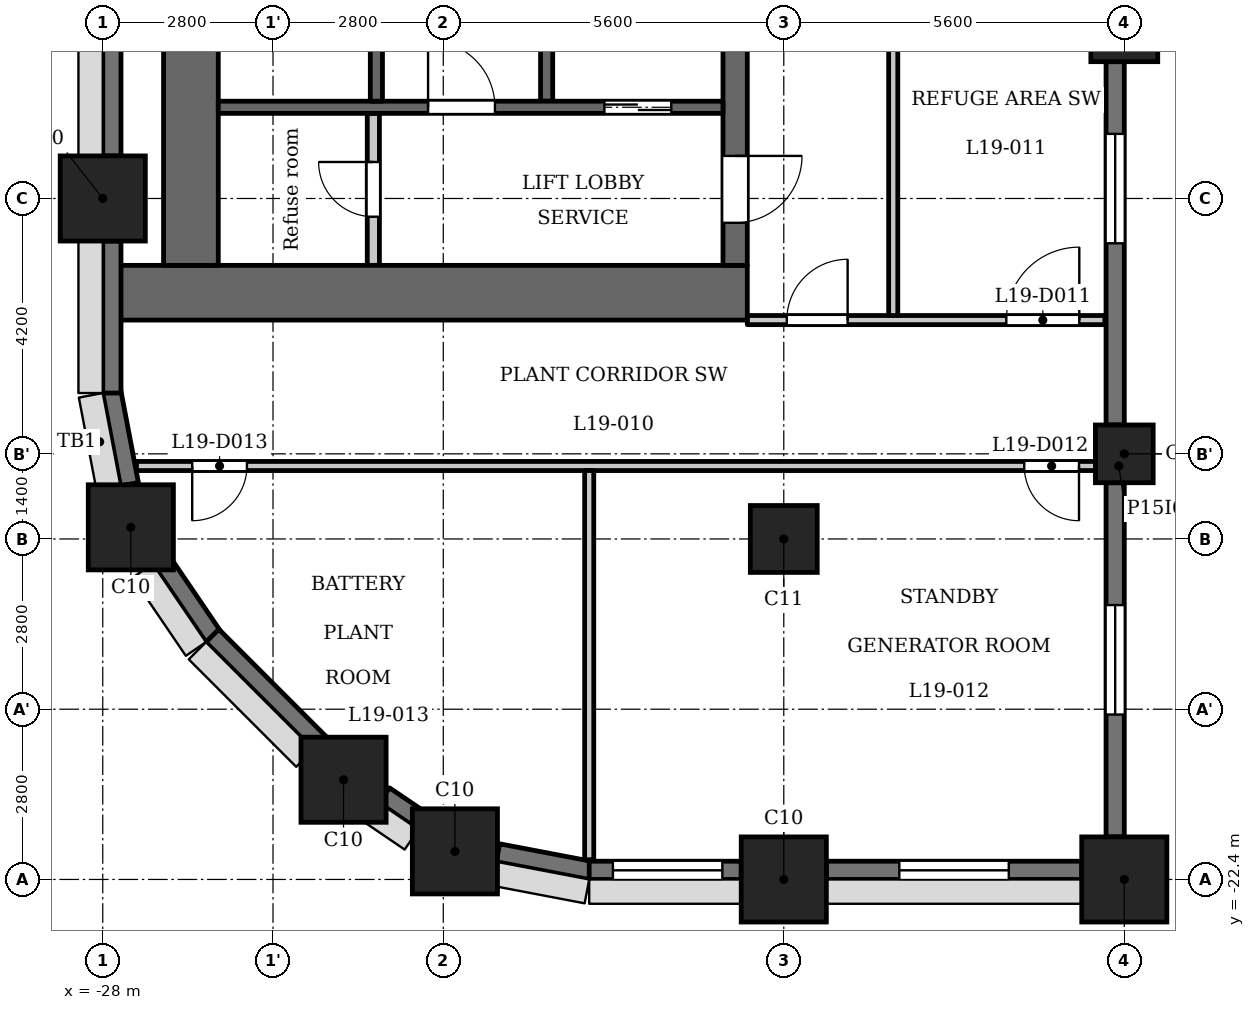
"""IFC4 building model, lengths in metres.
Left out: names, types, materials, properties, quantities, classifications, styles, units other than length and angle.
Written with IfcOpenShell. Run it as: python <this file> out.ifc"""

import sys

from ifc_helpers import new_model, si_unit, direction, frame, frame_2d, origin, origin_2d, place, context, subcontext, project, spatial, rectangle, extrude, element, fill, save


model = new_model("IFC4")
c1 = context("Model", 3, precision=1e-05, world=origin(), true_north=direction((0.0, 1.0)))
c2 = subcontext(c1, "Body", "Model", "MODEL_VIEW")
j1 = project(units=[si_unit("LENGTHUNIT", "METRE"), si_unit("PLANEANGLEUNIT", "RADIAN")], contexts=[c1])
p1 = place(None, origin())
s1 = spatial("IfcSite", under=j1, at=p1, CompositionType="ELEMENT")
p2 = place(p1, origin())
s2 = spatial("IfcBuilding", under=s1, at=p2, CompositionType="ELEMENT")
p3 = place(p2, frame((0.0, 0.0, 77.9)))
s3 = spatial("IfcBuildingStorey", under=s2, at=p3, CompositionType="ELEMENT", Elevation=77.9)
for number, where, z_axis, x_axis in (
    (1, (-22.209, -21.938, 0.0), (0.0, 0.0, 1.0), (1.0, 0.0, 0.0)),
    (2, (-16.8, -22.4, 0.0), (0.0, 0.0, 1.0), (1.0, 0.0, 0.0)),
    (3, (-11.2, -22.4, 0.0), (0.0, 0.0, 1.0), (1.0, 0.0, 0.0)),
    (4, (-28.0, -11.2, 0.0), (0.0, 0.0, 1.0), (1.0, 0.0, 0.0)),
    (5, (-27.538, -16.609, 0.0), (0.0, 0.0, 1.0), (1.0, 0.0, 0.0)),
    (6, (-24.04, -20.76, 0.0), (0.0, 0.0, 1.0), (1.0, 0.0, 0.0)),
):
    element("IfcColumn", number, at=place(p3, frame(where, z_axis=z_axis, x_axis=x_axis)), inside=s3, PredefinedType="COLUMN", context=c2, shape_type="SweptSolid", body=[
        extrude(rectangle(XDim=1.4, YDim=1.4, at=origin_2d()), origin(), (0.0, 0.0, 1.0), 5.4),
    ])
for number, where, z_axis, x_axis in (
    (7, (-16.8, -16.8, 0.0), (0.0, 0.0, 1.0), (1.0, 0.0, 0.0)),
    (8, (-11.2, -8.4, 0.0), (0.0, 0.0, 1.0), (1.0, 0.0, 0.0)),
):
    element("IfcColumn", number, at=place(p3, frame(where, z_axis=z_axis, x_axis=x_axis)), inside=s3, PredefinedType="COLUMN", context=c2, shape_type="SweptSolid", body=[
        extrude(rectangle(XDim=1.1, YDim=1.1, at=origin_2d()), origin(), (0.0, 0.0, 1.0), 5.4),
    ])
p4 = place(p3, frame((-11.2, -15.4, 0.0), z_axis=(0.0, 0.0, 1.0), x_axis=(1.0, 0.0, 0.0)))
e9 = element("IfcColumn", 9, at=p4, inside=s3, PredefinedType="COLUMN", context=c2, shape_type="SweptSolid", body=[
    extrude(rectangle(XDim=0.95, YDim=0.95, at=origin_2d()), origin(), (0.0, 0.0, 1.0), 5.4),
])
for number, where, z_axis, x_axis in (
    (10, (-27.853, -14.372, 0.0), (0.0, 0.0, 1.0), (0.187, -0.982, 0.0)),
    (11, (-27.053, -17.126, 0.0), (0.0, 0.0, 1.0), (0.562, -0.827, 0.0)),
):
    element("IfcWall", number, at=place(p3, frame(where, z_axis=z_axis, x_axis=x_axis)), inside=s3, PredefinedType="SOLIDWALL", context=c2, shape_type="SweptSolid", body=[
        extrude(rectangle(XDim=1.556, YDim=0.3, at=frame_2d((0.778, 0.0))), origin(), (0.0, 0.0, 1.0), 4.25),
    ])
p5 = place(p3, frame((-26.197, -18.391, 0.0), z_axis=(0.0, 0.0, 1.0), x_axis=(0.707057949532, -0.707155609469, 0.0)))
e12 = element("IfcWall", 12, at=p5, inside=s3, PredefinedType="SOLIDWALL", context=c2, shape_type="SweptSolid", body=[
    extrude(rectangle(XDim=2.5, YDim=0.3, at=frame_2d((1.25, 0.0))), origin(), (0.0, 0.0, 1.0), 4.25),
])
p6 = place(p3, frame((-23.368, -21.017, 0.0), z_axis=(0.0, 0.0, 1.0), x_axis=(0.827037530089, -0.562146710232, 0.0)))
e13 = element("IfcWall", 13, at=p6, inside=s3, PredefinedType="SOLIDWALL", context=c2, shape_type="SweptSolid", body=[
    extrude(rectangle(XDim=0.777, YDim=0.3, at=frame_2d((0.388, 0.0))), origin(), (0.0, 0.0, 1.0), 5.1),
])
p7 = place(p3, frame((-21.5, -21.961, 0.0), z_axis=(0.0, 0.0, 1.0), x_axis=(0.982297345734, -0.187328386968, 0.0)))
e14 = element("IfcWall", 14, at=p7, inside=s3, PredefinedType="SOLIDWALL", context=c2, shape_type="SweptSolid", body=[
    extrude(rectangle(XDim=1.556, YDim=0.3, at=frame_2d((0.778, 0.0))), origin(), (0.0, 0.0, 1.0), 4.25),
])
p8 = place(p3, frame((-20.0, -22.25, 0.0), z_axis=(0.0, 0.0, 1.0), x_axis=(1.0, 0.0, 0.0)))
e15 = element("IfcWall", 15, at=p8, inside=s3, PredefinedType="SOLIDWALL", context=c2, shape_type="SweptSolid", body=[
    extrude(rectangle(XDim=2.5, YDim=0.3, at=frame_2d((1.25, 0.0))), origin(), (0.0, 0.0, 1.0), 4.25),
])
p9 = place(p8, frame((0.39, 0.0, 0.9)))
e16 = element("IfcOpeningElement", 16, at=p9, cuts=e15, PredefinedType="OPENING", context=c2, shape_type="SweptSolid", body=[
    extrude(rectangle(XDim=1.8, YDim=1.5, at=frame_2d((0.9, 0.75))), frame((0.0, 0.16, 0.0), z_axis=(0.0, -1.0, 0.0), x_axis=(1.0, 0.0, 0.0)), (0.0, 0.0, 1.0), 0.32),
])
p10 = place(p3, frame((-16.1, -22.25, 0.0), z_axis=(0.0, 0.0, 1.0), x_axis=(1.0, 0.0, 0.0)))
e17 = element("IfcWall", 17, at=p10, inside=s3, PredefinedType="SOLIDWALL", context=c2, shape_type="SweptSolid", body=[
    extrude(rectangle(XDim=4.2, YDim=0.3, at=frame_2d((2.1, 0.0))), origin(), (0.0, 0.0, 1.0), 4.25),
])
p11 = place(p10, frame((1.2, 0.0, 0.9)))
e18 = element("IfcOpeningElement", 18, at=p11, cuts=e17, PredefinedType="OPENING", context=c2, shape_type="SweptSolid", body=[
    extrude(rectangle(XDim=1.8, YDim=1.5, at=frame_2d((0.9, 0.75))), frame((0.0, 0.16, 0.0), z_axis=(0.0, -1.0, 0.0), x_axis=(1.0, 0.0, 0.0)), (0.0, 0.0, 1.0), 0.32),
])
p12 = place(p3, frame((-11.35, -21.7, 0.0), z_axis=(0.0, 0.0, 1.0), x_axis=(0.0, 1.0, 0.0)))
e19 = element("IfcWall", 19, at=p12, inside=s3, PredefinedType="SOLIDWALL", context=c2, shape_type="SweptSolid", body=[
    extrude(rectangle(XDim=5.825, YDim=0.3, at=frame_2d((2.913, 0.0))), origin(), (0.0, 0.0, 1.0), 5.1),
])
p13 = place(p12, frame((2.012, 0.0, 0.9)))
e20 = element("IfcOpeningElement", 20, at=p13, cuts=e19, PredefinedType="OPENING", context=c2, shape_type="SweptSolid", body=[
    extrude(rectangle(XDim=1.8, YDim=1.5, at=frame_2d((0.9, 0.75))), frame((0.0, 0.16, 0.0), z_axis=(0.0, -1.0, 0.0), x_axis=(1.0, 0.0, 0.0)), (0.0, 0.0, 1.0), 0.32),
])
p14 = place(p3, frame((-11.35, -14.925, 0.0), z_axis=(0.0, 0.0, 1.0), x_axis=(0.0, 1.0, 0.0)))
e21 = element("IfcWall", 21, at=p14, inside=s3, PredefinedType="SOLIDWALL", context=c2, shape_type="SweptSolid", body=[
    extrude(rectangle(XDim=5.975, YDim=0.3, at=frame_2d((2.988, 0.0))), origin(), (0.0, 0.0, 1.0), 5.1),
])
p15 = place(p14, frame((2.988, 0.0, 0.9)))
e22 = element("IfcOpeningElement", 22, at=p15, cuts=e21, PredefinedType="OPENING", context=c2, shape_type="SweptSolid", body=[
    extrude(rectangle(XDim=1.8, YDim=1.5, at=frame_2d((0.9, 0.75))), frame((0.0, 0.16, 0.0), z_axis=(0.0, -1.0, 0.0), x_axis=(1.0, 0.0, 0.0)), (0.0, 0.0, 1.0), 0.32),
])
p16 = place(p3, frame((-27.85, -6.3, 0.0), z_axis=(0.0, 0.0, 1.0), x_axis=(0.0, -1.0, 0.0)))
e23 = element("IfcWall", 23, at=p16, inside=s3, PredefinedType="SOLIDWALL", context=c2, shape_type="SweptSolid", body=[
    extrude(rectangle(XDim=4.2, YDim=0.3, at=frame_2d((2.1, 0.0))), origin(), (0.0, 0.0, 1.0), 4.25),
])
p17 = place(p3, frame((-27.85, -11.9, 0.0), z_axis=(0.0, 0.0, 1.0), x_axis=(0.0, -1.0, 0.0)))
e24 = element("IfcWall", 24, at=p17, inside=s3, PredefinedType="SOLIDWALL", context=c2, shape_type="SweptSolid", body=[
    extrude(rectangle(XDim=2.5, YDim=0.3, at=frame_2d((1.25, 0.0))), origin(), (0.0, 0.0, 1.0), 4.25),
])
p18 = place(p3, frame((-20.7, -9.6, 0.0), z_axis=(0.0, 0.0, 1.0), x_axis=(0.0, 1.0, 0.0)))
e25 = element("IfcWall", 25, at=p18, inside=s3, PredefinedType="SHEAR", context=c2, shape_type="SweptSolid", body=[
    extrude(rectangle(XDim=9.75, YDim=0.2, at=frame_2d((4.875, 0.0))), origin(), (0.0, 0.0, 1.0), 5.1),
])
p19 = place(p3, frame((-17.4, -12.75, 0.0), z_axis=(0.0, 0.0, 1.0), x_axis=(-1.0, 0.0, 0.0)))
e26 = element("IfcWall", 26, at=p19, inside=s3, PredefinedType="SHEAR", context=c2, shape_type="SweptSolid", body=[
    extrude(rectangle(XDim=10.4, YDim=0.9, at=frame_2d((5.2, 0.0))), origin(), (0.0, 0.0, 1.0), 5.1),
])
p20 = place(p3, frame((-17.6, -12.3, 0.0), z_axis=(0.0, 0.0, 1.0), x_axis=(0.0, 1.0, 0.0)))
e27 = element("IfcWall", 27, at=p20, inside=s3, PredefinedType="SHEAR", context=c2, shape_type="SweptSolid", body=[
    extrude(rectangle(XDim=24.6, YDim=0.4, at=frame_2d((12.3, 0.0))), origin(), (0.0, 0.0, 1.0), 5.1),
])
p21 = place(p20, frame((6.0, 0.0, 0.0)))
e28 = element("IfcOpeningElement", 28, at=p21, cuts=e27, PredefinedType="OPENING", context=c2, shape_type="SweptSolid", body=[
    extrude(rectangle(XDim=1.1, YDim=2.1, at=frame_2d((0.55, 1.05))), frame((0.0, 0.21, 0.0), z_axis=(0.0, -1.0, 0.0), x_axis=(1.0, 0.0, 0.0)), (0.0, 0.0, 1.0), 0.42),
])
p22 = place(p20, frame((8.4, 0.0, 0.0)))
e29 = element("IfcOpeningElement", 29, at=p22, cuts=e27, PredefinedType="OPENING", context=c2, shape_type="SweptSolid", body=[
    extrude(rectangle(XDim=1.1, YDim=2.1, at=frame_2d((0.55, 1.05))), frame((0.0, 0.21, 0.0), z_axis=(0.0, -1.0, 0.0), x_axis=(1.0, 0.0, 0.0)), (0.0, 0.0, 1.0), 0.42),
])
p23 = place(p20, frame((10.8, 0.0, 0.0)))
e30 = element("IfcOpeningElement", 30, at=p23, cuts=e27, PredefinedType="OPENING", context=c2, shape_type="SweptSolid", body=[
    extrude(rectangle(XDim=1.1, YDim=2.1, at=frame_2d((0.55, 1.05))), frame((0.0, 0.21, 0.0), z_axis=(0.0, -1.0, 0.0), x_axis=(1.0, 0.0, 0.0)), (0.0, 0.0, 1.0), 0.42),
])
p24 = place(p20, frame((16.75, 0.0, 0.0)))
e31 = element("IfcOpeningElement", 31, at=p24, cuts=e27, PredefinedType="OPENING", context=c2, shape_type="SweptSolid", body=[
    extrude(rectangle(XDim=0.9, YDim=2.1, at=frame_2d((0.45, 1.05))), frame((0.0, 0.21, 0.0), z_axis=(0.0, -1.0, 0.0), x_axis=(1.0, 0.0, 0.0)), (0.0, 0.0, 1.0), 0.42),
])
p25 = place(p20, frame((22.8, 0.0, 0.0)))
e32 = element("IfcOpeningElement", 32, at=p25, cuts=e27, PredefinedType="OPENING", context=c2, shape_type="SweptSolid", body=[
    extrude(rectangle(XDim=1.1, YDim=2.1, at=frame_2d((0.55, 1.05))), frame((0.0, 0.21, 0.0), z_axis=(0.0, -1.0, 0.0), x_axis=(1.0, 0.0, 0.0)), (0.0, 0.0, 1.0), 0.42),
])
p26 = place(p20, frame((0.7, 0.0, 0.0)))
e33 = element("IfcOpeningElement", 33, at=p26, cuts=e27, PredefinedType="OPENING", context=c2, shape_type="SweptSolid", body=[
    extrude(rectangle(XDim=1.1, YDim=2.1, at=frame_2d((0.55, 1.05))), frame((0.0, 0.21, 0.0), z_axis=(0.0, -1.0, 0.0), x_axis=(1.0, 0.0, 0.0)), (0.0, 0.0, 1.0), 0.42),
])
p27 = place(p20, frame((12.775, 0.0, 0.0)))
e34 = element("IfcOpeningElement", 34, at=p27, cuts=e27, PredefinedType="OPENING", context=c2, shape_type="SweptSolid", body=[
    extrude(rectangle(XDim=1.8, YDim=2.1, at=frame_2d((0.9, 1.05))), frame((0.0, 0.21, 0.0), z_axis=(0.0, -1.0, 0.0), x_axis=(1.0, 0.0, 0.0)), (0.0, 0.0, 1.0), 0.42),
])
p28 = place(p3, frame((-26.55, -12.3, 0.0), z_axis=(0.0, 0.0, 1.0), x_axis=(0.0, 1.0, 0.0)))
e35 = element("IfcWall", 35, at=p28, inside=s3, PredefinedType="SHEAR", context=c2, shape_type="SweptSolid", body=[
    extrude(rectangle(XDim=24.6, YDim=0.9, at=frame_2d((12.3, 0.0))), origin(), (0.0, 0.0, 1.0), 5.1),
])
p29 = place(p3, frame((-23.55, -12.3, 0.0), z_axis=(0.0, 0.0, 1.0), x_axis=(0.0, 1.0, 0.0)))
e36 = element("IfcWall", 36, at=p29, inside=s3, PredefinedType="PARTITIONING", context=c2, shape_type="SweptSolid", body=[
    extrude(rectangle(XDim=2.5, YDim=0.2, at=frame_2d((1.25, 0.0))), origin(), (0.0, 0.0, 1.0), 5.1),
])
p30 = place(p29, frame((0.8, 0.0, 0.0)))
e37 = element("IfcOpeningElement", 37, at=p30, cuts=e36, PredefinedType="OPENING", context=c2, shape_type="SweptSolid", body=[
    extrude(rectangle(XDim=0.9, YDim=2.1, at=frame_2d((0.45, 1.05))), frame((0.0, 0.11, 0.0), z_axis=(0.0, -1.0, 0.0), x_axis=(1.0, 0.0, 0.0)), (0.0, 0.0, 1.0), 0.22),
])
p31 = place(p3, frame((-17.8, -9.7, 0.0), z_axis=(0.0, 0.0, 1.0), x_axis=(-1.0, 0.0, 0.0)))
e38 = element("IfcWall", 38, at=p31, inside=s3, PredefinedType="SHEAR", context=c2, shape_type="SweptSolid", body=[
    extrude(rectangle(XDim=8.3, YDim=0.2, at=frame_2d((4.15, 0.0))), origin(), (0.0, 0.0, 1.0), 5.1),
])
p32 = place(p31, frame((0.85, 0.0, 0.0)))
e39 = element("IfcOpeningElement", 39, at=p32, cuts=e38, PredefinedType="OPENING", context=c2, shape_type="SweptSolid", body=[
    extrude(rectangle(XDim=1.1, YDim=2.1, at=frame_2d((0.55, 1.05))), frame((0.0, 0.11, 0.0), z_axis=(0.0, -1.0, 0.0), x_axis=(1.0, 0.0, 0.0)), (0.0, 0.0, 1.0), 0.22),
])
p33 = place(p31, frame((3.75, 0.0, 0.0)))
e40 = element("IfcOpeningElement", 40, at=p33, cuts=e38, PredefinedType="OPENING", context=c2, shape_type="SweptSolid", body=[
    extrude(rectangle(XDim=1.1, YDim=2.1, at=frame_2d((0.55, 1.05))), frame((0.0, 0.11, 0.0), z_axis=(0.0, -1.0, 0.0), x_axis=(1.0, 0.0, 0.0)), (0.0, 0.0, 1.0), 0.22),
])
p34 = place(p3, frame((-23.5, -9.6, 0.0), z_axis=(0.0, 0.0, 1.0), x_axis=(0.0, 1.0, 0.0)))
e41 = element("IfcWall", 41, at=p34, inside=s3, PredefinedType="SHEAR", context=c2, shape_type="SweptSolid", body=[
    extrude(rectangle(XDim=6.9, YDim=0.2, at=frame_2d((3.45, 0.0))), origin(), (0.0, 0.0, 1.0), 5.1),
])
p35 = place(p3, frame((-27.446, -15.6, 0.0), z_axis=(0.0, 0.0, 1.0), x_axis=(1.0, 0.0, 0.0)))
e42 = element("IfcWall", 42, at=p35, inside=s3, PredefinedType="PARTITIONING", context=c2, shape_type="SweptSolid", body=[
    extrude(rectangle(XDim=16.156, YDim=0.15, at=frame_2d((8.078, 0.0))), origin(), (0.0, 0.0, 1.0), 5.1),
])
p36 = place(p35, frame((14.601, 0.0, 0.0)))
e43 = element("IfcOpeningElement", 43, at=p36, cuts=e42, PredefinedType="OPENING", context=c2, shape_type="SweptSolid", body=[
    extrude(rectangle(XDim=0.9, YDim=2.1, at=frame_2d((0.45, 1.05))), frame((0.0, 0.085, 0.0), z_axis=(0.0, -1.0, 0.0), x_axis=(1.0, 0.0, 0.0)), (0.0, 0.0, 1.0), 0.17),
])
p37 = place(p35, frame((0.917, 0.0, 0.0)))
e44 = element("IfcOpeningElement", 44, at=p37, cuts=e42, PredefinedType="OPENING", context=c2, shape_type="SweptSolid", body=[
    extrude(rectangle(XDim=0.9, YDim=2.1, at=frame_2d((0.45, 1.05))), frame((0.0, 0.085, 0.0), z_axis=(0.0, -1.0, 0.0), x_axis=(1.0, 0.0, 0.0)), (0.0, 0.0, 1.0), 0.17),
])
p38 = place(p3, frame((-17.4, -13.2, 0.0), z_axis=(0.0, 0.0, 1.0), x_axis=(1.0, 0.0, 0.0)))
e45 = element("IfcWall", 45, at=p38, inside=s3, PredefinedType="PARTITIONING", context=c2, shape_type="SweptSolid", body=[
    extrude(rectangle(XDim=5.88, YDim=0.15, at=frame_2d((2.94, 0.0))), origin(), (0.0, 0.0, 1.0), 5.1),
])
p39 = place(p38, frame((0.65, 0.0, 0.0)))
e46 = element("IfcOpeningElement", 46, at=p39, cuts=e45, PredefinedType="OPENING", context=c2, shape_type="SweptSolid", body=[
    extrude(rectangle(XDim=1.0, YDim=2.1, at=frame_2d((0.5, 1.05))), frame((0.0, 0.085, 0.0), z_axis=(0.0, -1.0, 0.0), x_axis=(1.0, 0.0, 0.0)), (0.0, 0.0, 1.0), 0.17),
])
p40 = place(p38, frame((4.26, 0.0, 0.0)))
e47 = element("IfcOpeningElement", 47, at=p40, cuts=e45, PredefinedType="OPENING", context=c2, shape_type="SweptSolid", body=[
    extrude(rectangle(XDim=1.2, YDim=2.1, at=frame_2d((0.6, 1.05))), frame((0.0, 0.085, 0.0), z_axis=(0.0, -1.0, 0.0), x_axis=(1.0, 0.0, 0.0)), (0.0, 0.0, 1.0), 0.17),
])
p41 = place(p3, frame((-20.0, -22.075, 0.0), z_axis=(0.0, 0.0, 1.0), x_axis=(0.0, 1.0, 0.0)))
e48 = element("IfcWall", 48, at=p41, inside=s3, PredefinedType="PARTITIONING", context=c2, shape_type="SweptSolid", body=[
    extrude(rectangle(XDim=6.4, YDim=0.15, at=frame_2d((3.2, 0.0))), origin(), (0.0, 0.0, 1.0), 5.1),
])
p42 = place(p3, frame((-15.0, -13.125, 0.0), z_axis=(0.0, 0.0, 1.0), x_axis=(0.0, 1.0, 0.0)))
e49 = element("IfcWall", 49, at=p42, inside=s3, PredefinedType="PARTITIONING", context=c2, shape_type="SweptSolid", body=[
    extrude(rectangle(XDim=6.356, YDim=0.15, at=frame_2d((3.178, 0.0))), origin(), (0.0, 0.0, 1.0), 5.1),
])
p43 = place(p32, origin())
e50 = element("IfcDoor", 50, at=p43, inside=s3, OperationType="DOUBLE_DOOR_SLIDING", PredefinedType="DOOR", context=c2, shape_type="SweptSolid", body=[
    extrude(rectangle(XDim=1.1, YDim=2.1, at=frame_2d((0.55, 1.05))), frame((0.0, 0.025, 0.0), z_axis=(0.0, -1.0, 0.0), x_axis=(1.0, 0.0, 0.0)), (0.0, 0.0, 1.0), 0.05),
])
fill(e39, e50)
p44 = place(p26, origin())
e51 = element("IfcDoor", 51, at=p44, inside=s3, OperationType="SINGLE_SWING_RIGHT", PredefinedType="DOOR", context=c2, shape_type="SweptSolid", body=[
    extrude(rectangle(XDim=1.1, YDim=2.1, at=frame_2d((0.55, 1.05))), frame((0.0, 0.025, 0.0), z_axis=(0.0, -1.0, 0.0), x_axis=(1.0, 0.0, 0.0)), (0.0, 0.0, 1.0), 0.05),
])
fill(e33, e51)
p45 = place(p30, origin())
e52 = element("IfcDoor", 52, at=p45, inside=s3, OperationType="SINGLE_SWING_LEFT", PredefinedType="DOOR", context=c2, shape_type="SweptSolid", body=[
    extrude(rectangle(XDim=0.9, YDim=2.1, at=frame_2d((0.45, 1.05))), frame((0.0, 0.025, 0.0), z_axis=(0.0, -1.0, 0.0), x_axis=(1.0, 0.0, 0.0)), (0.0, 0.0, 1.0), 0.05),
])
fill(e37, e52)
p46 = place(p33, origin())
e53 = element("IfcDoor", 53, at=p46, inside=s3, OperationType="SINGLE_SWING_RIGHT", PredefinedType="DOOR", context=c2, shape_type="SweptSolid", body=[
    extrude(rectangle(XDim=1.1, YDim=2.1, at=frame_2d((0.55, 1.05))), frame((0.0, 0.025, 0.0), z_axis=(0.0, -1.0, 0.0), x_axis=(1.0, 0.0, 0.0)), (0.0, 0.0, 1.0), 0.05),
])
fill(e40, e53)
p47 = place(p39, origin())
e54 = element("IfcDoor", 54, at=p47, inside=s3, OperationType="SINGLE_SWING_LEFT", PredefinedType="DOOR", context=c2, shape_type="SweptSolid", body=[
    extrude(rectangle(XDim=1.0, YDim=2.1, at=frame_2d((0.5, 1.05))), frame((0.0, 0.025, 0.0), z_axis=(0.0, -1.0, 0.0), x_axis=(1.0, 0.0, 0.0)), (0.0, 0.0, 1.0), 0.05),
])
fill(e46, e54)
p48 = place(p40, origin())
e55 = element("IfcDoor", 55, at=p48, inside=s3, OperationType="SINGLE_SWING_LEFT", PredefinedType="DOOR", context=c2, shape_type="SweptSolid", body=[
    extrude(rectangle(XDim=1.2, YDim=2.1, at=frame_2d((0.6, 1.05))), frame((0.0, 0.025, 0.0), z_axis=(0.0, -1.0, 0.0), x_axis=(1.0, 0.0, 0.0)), (0.0, 0.0, 1.0), 0.05),
])
fill(e47, e55)
p49 = place(p36, origin())
e56 = element("IfcDoor", 56, at=p49, inside=s3, OperationType="SINGLE_SWING_RIGHT", PredefinedType="DOOR", context=c2, shape_type="SweptSolid", body=[
    extrude(rectangle(XDim=0.9, YDim=2.1, at=frame_2d((0.45, 1.05))), frame((0.0, 0.025, 0.0), z_axis=(0.0, -1.0, 0.0), x_axis=(1.0, 0.0, 0.0)), (0.0, 0.0, 1.0), 0.05),
])
fill(e43, e56)
p50 = place(p37, origin())
e57 = element("IfcDoor", 57, at=p50, inside=s3, OperationType="SINGLE_SWING_LEFT", PredefinedType="DOOR", context=c2, shape_type="SweptSolid", body=[
    extrude(rectangle(XDim=0.9, YDim=2.1, at=frame_2d((0.45, 1.05))), frame((0.0, 0.025, 0.0), z_axis=(0.0, -1.0, 0.0), x_axis=(1.0, 0.0, 0.0)), (0.0, 0.0, 1.0), 0.05),
])
fill(e44, e57)
p51 = place(p9, origin())
e58 = element("IfcWindow", 58, at=p51, inside=s3, PartitioningType="SINGLE_PANEL", PredefinedType="WINDOW", context=c2, shape_type="SweptSolid", body=[
    extrude(rectangle(XDim=1.8, YDim=1.5, at=frame_2d((0.9, 0.75))), frame((0.0, 0.03, 0.0), z_axis=(0.0, -1.0, 0.0), x_axis=(1.0, 0.0, 0.0)), (0.0, 0.0, 1.0), 0.06),
])
fill(e16, e58)
p52 = place(p11, origin())
e59 = element("IfcWindow", 59, at=p52, inside=s3, PartitioningType="SINGLE_PANEL", PredefinedType="WINDOW", context=c2, shape_type="SweptSolid", body=[
    extrude(rectangle(XDim=1.8, YDim=1.5, at=frame_2d((0.9, 0.75))), frame((0.0, 0.03, 0.0), z_axis=(0.0, -1.0, 0.0), x_axis=(1.0, 0.0, 0.0)), (0.0, 0.0, 1.0), 0.06),
])
fill(e18, e59)
p53 = place(p13, origin())
e60 = element("IfcWindow", 60, at=p53, inside=s3, PartitioningType="SINGLE_PANEL", PredefinedType="WINDOW", context=c2, shape_type="SweptSolid", body=[
    extrude(rectangle(XDim=1.8, YDim=1.5, at=frame_2d((0.9, 0.75))), frame((0.0, 0.03, 0.0), z_axis=(0.0, -1.0, 0.0), x_axis=(1.0, 0.0, 0.0)), (0.0, 0.0, 1.0), 0.06),
])
fill(e20, e60)
p54 = place(p15, origin())
e61 = element("IfcWindow", 61, at=p54, inside=s3, PartitioningType="SINGLE_PANEL", PredefinedType="WINDOW", context=c2, shape_type="SweptSolid", body=[
    extrude(rectangle(XDim=1.8, YDim=1.5, at=frame_2d((0.9, 0.75))), frame((0.0, 0.03, 0.0), z_axis=(0.0, -1.0, 0.0), x_axis=(1.0, 0.0, 0.0)), (0.0, 0.0, 1.0), 0.06),
])
fill(e22, e61)
save(model, sys.argv[1])
